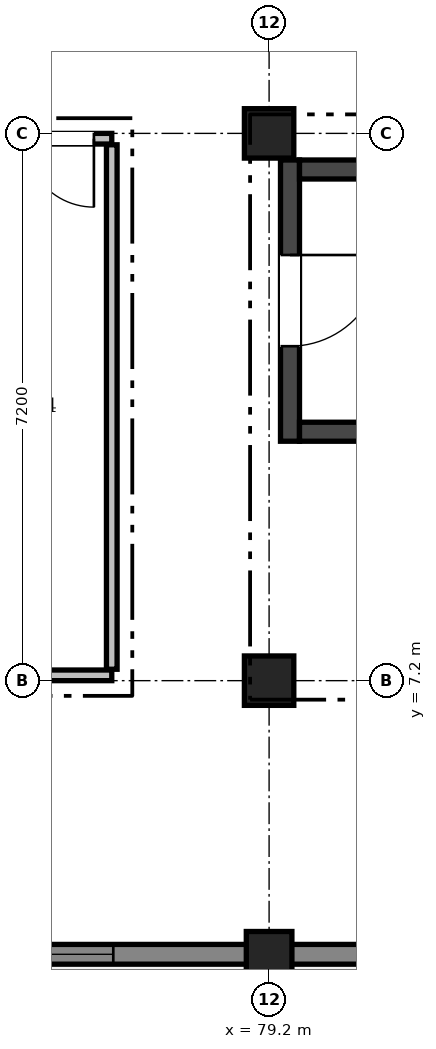
"""IFC4 building model, lengths in metres.
Left out: names, types, materials, properties, quantities, classifications, styles, units other than length and angle.
Written with IfcOpenShell. Run it as: python <this file> out.ifc"""

import sys

from ifc_helpers import new_model, si_unit, direction, frame, frame_2d, origin, origin_2d, place, context, subcontext, project, spatial, rectangle, extrude, element, fill, save


model = new_model("IFC4")
c1 = context("Model", 3, precision=1e-05, world=origin(), true_north=direction((0.0, 1.0)))
c2 = subcontext(c1, "Body", "Model", "MODEL_VIEW")
j1 = project(units=[si_unit("LENGTHUNIT", "METRE"), si_unit("PLANEANGLEUNIT", "RADIAN")], contexts=[c1])
p1 = place(None, origin())
s1 = spatial("IfcSite", under=j1, at=p1, CompositionType="ELEMENT")
p2 = place(p1, origin())
s2 = spatial("IfcBuilding", under=s1, at=p2, CompositionType="ELEMENT")
p3 = place(p2, frame((0.0, 0.0, 23.4)))
s3 = spatial("IfcBuildingStorey", under=s2, at=p3, CompositionType="ELEMENT", Elevation=23.4)
p4 = place(p3, frame((79.2, 3.6, 0.0), z_axis=(0.0, 0.0, 1.0), x_axis=(1.0, 0.0, 0.0)))
e1 = element("IfcColumn", 1, at=p4, inside=s3, PredefinedType="COLUMN", context=c2, shape_type="SweptSolid", body=[
    extrude(rectangle(XDim=0.6, YDim=0.6, at=origin_2d()), origin(), (0.0, 0.0, 1.0), 4.5),
])
for number, where, z_axis, x_axis in (
    (2, (79.2, 7.2, 0.0), (0.0, 0.0, 1.0), (1.0, 0.0, 0.0)),
    (3, (79.2, 14.4, 0.0), (0.0, 0.0, 1.0), (1.0, 0.0, 0.0)),
):
    element("IfcColumn", number, at=place(p3, frame(where, z_axis=z_axis, x_axis=x_axis)), inside=s3, PredefinedType="COLUMN", context=c2, shape_type="SweptSolid", body=[
        extrude(rectangle(XDim=0.65, YDim=0.65, at=origin_2d()), origin(), (0.0, 0.0, 1.0), 4.5),
    ])
p5 = place(p3, frame((86.4, 3.6, 0.0), z_axis=(0.0, 0.0, 1.0), x_axis=(-1.0, 0.0, 0.0)))
e4 = element("IfcWall", 4, at=p5, inside=s3, PredefinedType="SOLIDWALL", context=c2, shape_type="SweptSolid", body=[
    extrude(rectangle(XDim=7.2, YDim=0.26, at=frame_2d((3.6, 0.0))), origin(), (0.0, 0.0, 1.0), 4.22),
])
p6 = place(p5, frame((2.175, 0.0, 0.95)))
e5 = element("IfcOpeningElement", 5, at=p6, cuts=e4, PredefinedType="OPENING", context=c2, shape_type="SweptSolid", body=[
    extrude(rectangle(XDim=2.85, YDim=1.55, at=frame_2d((1.425, 0.775))), frame((0.0, 0.142, 0.0), z_axis=(0.0, -1.0, 0.0), x_axis=(1.0, 0.0, 0.0)), (0.0, 0.0, 1.0), 0.284),
])
p7 = place(p3, frame((79.2, 3.6, 0.0), z_axis=(0.0, 0.0, 1.0), x_axis=(-1.0, 0.0, 0.0)))
e6 = element("IfcWall", 6, at=p7, inside=s3, PredefinedType="SOLIDWALL", context=c2, shape_type="SweptSolid", body=[
    extrude(rectangle(XDim=7.2, YDim=0.26, at=frame_2d((3.6, 0.0))), origin(), (0.0, 0.0, 1.0), 4.22),
])
p8 = place(p7, frame((2.05, 0.0, 0.95)))
e7 = element("IfcOpeningElement", 7, at=p8, cuts=e6, PredefinedType="OPENING", context=c2, shape_type="SweptSolid", body=[
    extrude(rectangle(XDim=3.1, YDim=1.55, at=frame_2d((1.55, 0.775))), frame((0.0, 0.142, 0.0), z_axis=(0.0, -1.0, 0.0), x_axis=(1.0, 0.0, 0.0)), (0.0, 0.0, 1.0), 0.284),
])
p9 = place(p3, frame((79.475, 10.35, 0.0), z_axis=(0.0, 0.0, 1.0), x_axis=(0.0, 1.0, 0.0)))
e8 = element("IfcWall", 8, at=p9, inside=s3, PredefinedType="SHEAR", context=c2, shape_type="SweptSolid", body=[
    extrude(rectangle(XDim=3.7, YDim=0.25, at=frame_2d((1.85, 0.0))), origin(), (0.0, 0.0, 1.0), 4.25),
])
p10 = place(p9, frame((1.25, 0.0, 0.0)))
e9 = element("IfcOpeningElement", 9, at=p10, cuts=e8, PredefinedType="OPENING", context=c2, shape_type="SweptSolid", body=[
    extrude(rectangle(XDim=1.2, YDim=2.15, at=frame_2d((0.6, 1.075))), frame((0.0, 0.137, 0.0), z_axis=(0.0, -1.0, 0.0), x_axis=(1.0, 0.0, 0.0)), (0.0, 0.0, 1.0), 0.274),
])
for number, where, z_axis, x_axis in (
    (10, (79.6, 10.475, 0.0), (0.0, 0.0, 1.0), (1.0, 0.0, 0.0)),
    (11, (79.6, 13.925, 0.0), (0.0, 0.0, 1.0), (1.0, 0.0, 0.0)),
):
    element("IfcWall", number, at=place(p3, frame(where, z_axis=z_axis, x_axis=x_axis)), inside=s3, PredefinedType="SHEAR", context=c2, shape_type="SweptSolid", body=[
        extrude(rectangle(XDim=7.6, YDim=0.25, at=frame_2d((3.8, 0.0))), origin(), (0.0, 0.0, 1.0), 4.25),
    ])
p11 = place(p3, frame((72.07, 7.27, 0.0), z_axis=(0.0, 0.0, 1.0), x_axis=(1.0, 0.0, 0.0)))
e12 = element("IfcWall", 12, at=p11, inside=s3, PredefinedType="PARTITIONING", context=c2, shape_type="SweptSolid", body=[
    extrude(rectangle(XDim=5.06, YDim=0.14, at=frame_2d((2.53, 0.0))), origin(), (0.0, 0.0, 1.0), 3.73),
])
p12 = place(p3, frame((72.07, 14.33, 0.0), z_axis=(0.0, 0.0, 1.0), x_axis=(1.0, 0.0, 0.0)))
e13 = element("IfcWall", 13, at=p12, inside=s3, PredefinedType="PARTITIONING", context=c2, shape_type="SweptSolid", body=[
    extrude(rectangle(XDim=5.06, YDim=0.14, at=frame_2d((2.53, 0.0))), origin(), (0.0, 0.0, 1.0), 3.73),
])
p13 = place(p12, frame((0.88, 0.0, 0.0)))
e14 = element("IfcOpeningElement", 14, at=p13, cuts=e13, PredefinedType="OPENING", context=c2, shape_type="SweptSolid", body=[
    extrude(rectangle(XDim=0.94, YDim=2.1, at=frame_2d((0.47, 1.05))), frame((0.0, 0.082, 0.0), z_axis=(0.0, -1.0, 0.0), x_axis=(1.0, 0.0, 0.0)), (0.0, 0.0, 1.0), 0.164),
])
p14 = place(p12, frame((2.415, 0.0, 0.0)))
e15 = element("IfcOpeningElement", 15, at=p14, cuts=e13, PredefinedType="OPENING", context=c2, shape_type="SweptSolid", body=[
    extrude(rectangle(XDim=0.9, YDim=2.08, at=frame_2d((0.45, 1.04))), frame((0.0, 0.082, 0.0), z_axis=(0.0, -1.0, 0.0), x_axis=(1.0, 0.0, 0.0)), (0.0, 0.0, 1.0), 0.164),
])
p15 = place(p12, frame((3.925, 0.0, 0.0)))
e16 = element("IfcOpeningElement", 16, at=p15, cuts=e13, PredefinedType="OPENING", context=c2, shape_type="SweptSolid", body=[
    extrude(rectangle(XDim=0.9, YDim=2.08, at=frame_2d((0.45, 1.04))), frame((0.0, 0.082, 0.0), z_axis=(0.0, -1.0, 0.0), x_axis=(1.0, 0.0, 0.0)), (0.0, 0.0, 1.0), 0.164),
])
p16 = place(p3, frame((77.13, 7.35, 0.0), z_axis=(0.0, 0.0, 1.0), x_axis=(0.0, 1.0, 0.0)))
e17 = element("IfcWall", 17, at=p16, inside=s3, PredefinedType="PARTITIONING", context=c2, shape_type="SweptSolid", body=[
    extrude(rectangle(XDim=6.9, YDim=0.14, at=frame_2d((3.45, 0.0))), origin(), (0.0, 0.0, 1.0), 4.16),
])
p17 = place(p8, origin())
e18 = element("IfcWindow", 18, at=p17, inside=s3, PartitioningType="SINGLE_PANEL", PredefinedType="WINDOW", context=c2, shape_type="SweptSolid", body=[
    extrude(rectangle(XDim=3.1, YDim=1.55, at=frame_2d((1.55, 0.775))), frame((0.0, 0.03, 0.0), z_axis=(0.0, -1.0, 0.0), x_axis=(1.0, 0.0, 0.0)), (0.0, 0.0, 1.0), 0.06),
])
fill(e7, e18)
p18 = place(p10, frame((1.2, 0.0, 0.0), z_axis=(0.0, 0.0, 1.0), x_axis=(-1.0, 0.0, 0.0)))
e19 = element("IfcDoor", 19, at=p18, inside=s3, OperationType="SINGLE_SWING_LEFT", PredefinedType="DOOR", context=c2, shape_type="SweptSolid", body=[
    extrude(rectangle(XDim=1.2, YDim=2.15, at=frame_2d((0.6, 1.075))), frame((0.0, 0.025, 0.0), z_axis=(0.0, -1.0, 0.0), x_axis=(1.0, 0.0, 0.0)), (0.0, 0.0, 1.0), 0.05),
])
fill(e9, e19)
p19 = place(p15, frame((0.9, 0.0, 0.0), z_axis=(0.0, 0.0, 1.0), x_axis=(-1.0, 0.0, 0.0)))
e20 = element("IfcDoor", 20, at=p19, inside=s3, OperationType="SINGLE_SWING_LEFT", PredefinedType="DOOR", context=c2, shape_type="SweptSolid", body=[
    extrude(rectangle(XDim=0.9, YDim=2.08, at=frame_2d((0.45, 1.04))), frame((0.0, 0.025, 0.0), z_axis=(0.0, -1.0, 0.0), x_axis=(1.0, 0.0, 0.0)), (0.0, 0.0, 1.0), 0.05),
])
fill(e16, e20)
save(model, sys.argv[1])
